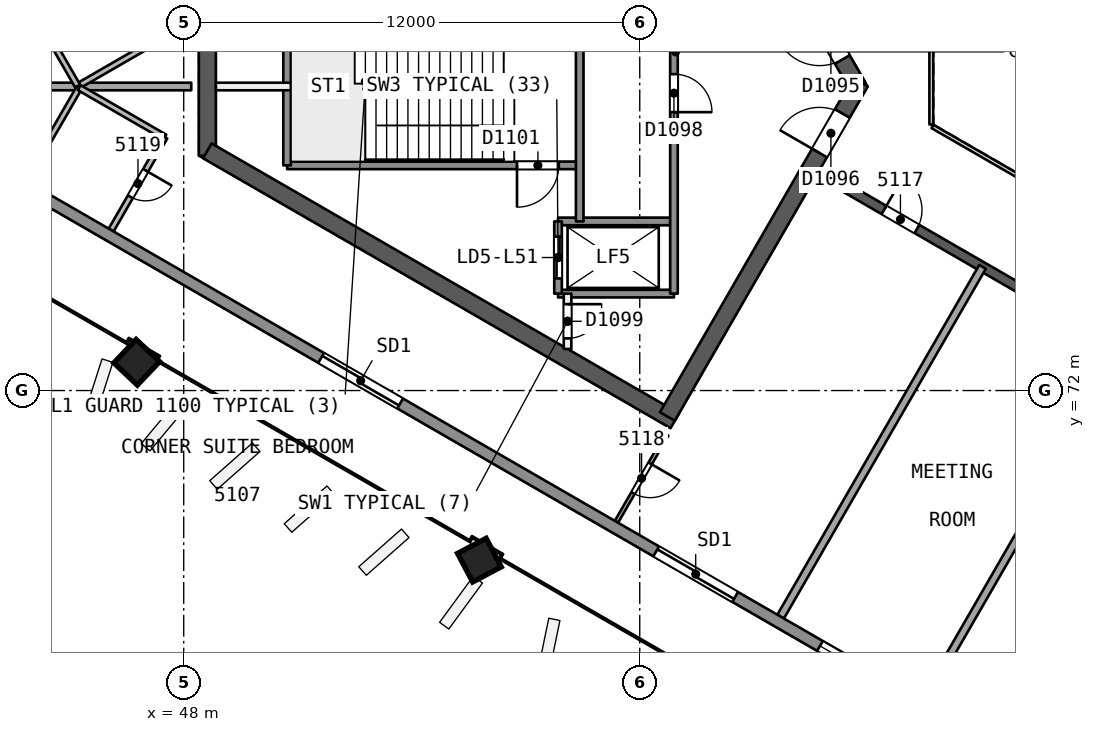
"""IFC4 building model, lengths in metres.
Left out: names, types, materials, properties, quantities, classifications, styles, units other than length and angle.
Written with IfcOpenShell. Run it as: python <this file> out.ifc"""

import sys

from ifc_helpers import new_model, si_unit, direction, frame, frame_2d, origin, origin_2d, place, context, subcontext, project, spatial, rectangle, extrude, element, fill, save


model = new_model("IFC4")
c1 = context("Model", 3, precision=1e-05, world=origin(), true_north=direction((0.0, 1.0)))
c2 = subcontext(c1, "Body", "Model", "MODEL_VIEW")
j1 = project(units=[si_unit("LENGTHUNIT", "METRE"), si_unit("PLANEANGLEUNIT", "RADIAN")], contexts=[c1])
p1 = place(None, origin())
s1 = spatial("IfcSite", under=j1, at=p1, CompositionType="ELEMENT")
p2 = place(p1, origin())
s2 = spatial("IfcBuilding", under=s1, at=p2, CompositionType="ELEMENT")
p3 = place(p2, frame((0.0, 0.0, 209.5)))
s3 = spatial("IfcBuildingStorey", under=s2, at=p3, CompositionType="ELEMENT", Elevation=209.5)
p4 = place(p3, frame((65.74, 80.0, 0.0), z_axis=(0.0, 0.0, 1.0), x_axis=(-0.499991857942, 0.866030104553, 0.0)))
e1 = element("IfcWall", 1, at=p4, inside=s3, PredefinedType="SHEAR", context=c2, shape_type="SweptSolid", body=[
    extrude(rectangle(XDim=10.25, YDim=0.45, at=frame_2d((5.125, 0.0))), origin(), (0.0, 0.0, 1.0), 3.7),
])
p5 = place(p4, frame((0.82, 0.0, 0.0)))
e2 = element("IfcOpeningElement", 2, at=p5, cuts=e1, PredefinedType="OPENING", context=c2, shape_type="SweptSolid", body=[
    extrude(rectangle(XDim=1.2, YDim=2.1, at=frame_2d((0.6, 1.05))), frame((0.0, 0.235, 0.0), z_axis=(0.0, -1.0, 0.0), x_axis=(1.0, 0.0, 0.0)), (0.0, 0.0, 1.0), 0.471),
])
p6 = place(p3, frame((48.622, 81.693, 0.0), z_axis=(0.0, 0.0, 1.0), x_axis=(0.0, -1.0, 0.0)))
e3 = element("IfcWall", 3, at=p6, inside=s3, PredefinedType="SHEAR", context=c2, shape_type="SweptSolid", body=[
    extrude(rectangle(XDim=3.515, YDim=0.45, at=frame_2d((1.758, 0.0))), origin(), (0.0, 0.0, 1.0), 3.7),
])
p7 = place(p3, frame((48.622, 78.307, 0.0), z_axis=(0.0, 0.0, 1.0), x_axis=(0.86602701116, -0.499997215934, 0.0)))
e4 = element("IfcWall", 4, at=p7, inside=s3, PredefinedType="SHEAR", context=c2, shape_type="SweptSolid", body=[
    extrude(rectangle(XDim=14.204, YDim=0.45, at=frame_2d((7.102, 0.0))), origin(), (0.0, 0.0, 1.0), 3.7),
])
p8 = place(p3, frame((60.728, 71.318, 0.0), z_axis=(0.0, 0.0, 1.0), x_axis=(0.500012416173, 0.866018235185, 0.0)))
e5 = element("IfcWall", 5, at=p8, inside=s3, PredefinedType="SHEAR", context=c2, shape_type="SweptSolid", body=[
    extrude(rectangle(XDim=10.155, YDim=0.45, at=frame_2d((5.078, 0.0))), origin(), (0.0, 0.0, 1.0), 3.7),
])
p9 = place(p8, frame((8.005, 0.0, 0.0)))
e6 = element("IfcOpeningElement", 6, at=p9, cuts=e5, PredefinedType="OPENING", context=c2, shape_type="SweptSolid", body=[
    extrude(rectangle(XDim=1.2, YDim=2.1, at=frame_2d((0.6, 1.05))), frame((0.0, 0.235, 0.0), z_axis=(0.0, -1.0, 0.0), x_axis=(1.0, 0.0, 0.0)), (0.0, 0.0, 1.0), 0.471),
])
p10 = place(p3, frame((64.7, 77.748, 0.0), z_axis=(0.0, 0.0, 1.0), x_axis=(0.866026492143, -0.499998114903, 0.0)))
e7 = element("IfcWall", 7, at=p10, inside=s3, PredefinedType="SHEAR", context=c2, shape_type="SweptSolid", body=[
    extrude(rectangle(XDim=15.588, YDim=0.25, at=frame_2d((7.794, 0.0))), origin(), (0.0, 0.0, 1.0), 3.3),
])
p11 = place(p10, frame((1.994, 0.0, 0.0)))
e8 = element("IfcOpeningElement", 8, at=p11, cuts=e7, PredefinedType="OPENING", context=c2, shape_type="SweptSolid", body=[
    extrude(rectangle(XDim=1.0, YDim=2.1, at=frame_2d((0.5, 1.05))), frame((0.0, 0.135, 0.0), z_axis=(0.0, -1.0, 0.0), x_axis=(1.0, 0.0, 0.0)), (0.0, 0.0, 1.0), 0.271),
])
p12 = place(p10, frame((6.571, 0.0, 0.0)))
e9 = element("IfcOpeningElement", 9, at=p12, cuts=e7, PredefinedType="OPENING", context=c2, shape_type="SweptSolid", body=[
    extrude(rectangle(XDim=1.2, YDim=2.4, at=frame_2d((0.6, 1.2))), frame((0.0, 0.135, 0.0), z_axis=(0.0, -1.0, 0.0), x_axis=(1.0, 0.0, 0.0)), (0.0, 0.0, 1.0), 0.271),
])
p13 = place(p10, frame((11.971, 0.0, 0.0)))
e10 = element("IfcOpeningElement", 10, at=p13, cuts=e7, PredefinedType="OPENING", context=c2, shape_type="SweptSolid", body=[
    extrude(rectangle(XDim=1.0, YDim=2.1, at=frame_2d((0.5, 1.05))), frame((0.0, 0.135, 0.0), z_axis=(0.0, -1.0, 0.0), x_axis=(1.0, 0.0, 0.0)), (0.0, 0.0, 1.0), 0.271),
])
p14 = place(p3, frame((46.729, 72.736, 0.0), z_axis=(0.02855911485, 0.006793507689, 0.999569019734), x_axis=(-0.865324312193, 0.500758709147, 0.021320176848)))
e11 = element("IfcColumn", 11, at=p14, inside=s3, PredefinedType="COLUMN", context=c2, shape_type="SweptSolid", body=[
    extrude(rectangle(XDim=0.85, YDim=0.85, at=origin_2d()), origin(), (0.0, 0.0, 1.0), 3.702),
])
p15 = place(p3, frame((55.758, 67.523, 0.0), z_axis=(0.019328516974, 0.012138044789, 0.999739504221), x_axis=(-0.865685889808, 0.500474070789, 0.010660424724)))
e12 = element("IfcColumn", 12, at=p15, inside=s3, PredefinedType="COLUMN", context=c2, shape_type="SweptSolid", body=[
    extrude(rectangle(XDim=0.85, YDim=0.85, at=origin_2d()), origin(), (0.0, 0.0, 1.0), 3.701),
])
p16 = place(p3, frame((47.462, 81.308, 0.0), z_axis=(0.0, 0.0, 1.0), x_axis=(-0.866021400173, -0.500006934395, 0.0)))
e13 = element("IfcWall", 13, at=p16, inside=s3, PredefinedType="PARTITIONING", context=c2, shape_type="SweptSolid", body=[
    extrude(rectangle(XDim=2.6, YDim=0.15, at=frame_2d((1.3, 0.0))), origin(), (0.0, 0.0, 1.0), 3.3),
])
p17 = place(p3, frame((45.211, 80.008, 0.0), z_axis=(0.0, 0.0, 1.0), x_axis=(-0.499954589381, 0.86605162003, 0.0)))
e14 = element("IfcWall", 14, at=p17, inside=s3, PredefinedType="PARTITIONING", context=c2, shape_type="SweptSolid", body=[
    extrude(rectangle(XDim=2.519, YDim=0.15, at=frame_2d((1.259, 0.0))), origin(), (0.0, 0.0, 1.0), 3.3),
])
p18 = place(p3, frame((43.951, 80.0, 0.0), z_axis=(0.0, 0.0, 1.0), x_axis=(1.0, 0.0, 0.0)))
e15 = element("IfcWall", 15, at=p18, inside=s3, PredefinedType="PARTITIONING", context=c2, shape_type="SweptSolid", body=[
    extrude(rectangle(XDim=4.247, YDim=0.2, at=frame_2d((2.123, 0.0))), origin(), (0.0, 0.0, 1.0), 3.3),
])
p19 = place(p3, frame((60.71, 70.838, 0.0), z_axis=(0.0, 0.0, 1.0), x_axis=(-0.49995654735, -0.86605048973, 0.0)))
e16 = element("IfcWall", 16, at=p19, inside=s3, PredefinedType="PARTITIONING", context=c2, shape_type="SweptSolid", body=[
    extrude(rectangle(XDim=2.648, YDim=0.1, at=frame_2d((1.324, 0.0))), origin(), (0.0, 0.0, 1.0), 3.3),
])
p20 = place(p19, frame((0.874, 0.0, 0.0)))
e17 = element("IfcOpeningElement", 17, at=p20, cuts=e16, PredefinedType="OPENING", context=c2, shape_type="SweptSolid", body=[
    extrude(rectangle(XDim=0.9, YDim=2.1, at=frame_2d((0.45, 1.05))), frame((0.0, 0.061, 0.0), z_axis=(0.0, -1.0, 0.0), x_axis=(1.0, 0.0, 0.0)), (0.0, 0.0, 1.0), 0.121),
])
p21 = place(p3, frame((63.707, 66.051, 0.0), z_axis=(0.0, 0.0, 1.0), x_axis=(0.499993571489, 0.866029115255, 0.0)))
e18 = element("IfcWall", 18, at=p21, inside=s3, PredefinedType="PARTITIONING", context=c2, shape_type="SweptSolid", body=[
    extrude(rectangle(XDim=10.627, YDim=0.2, at=frame_2d((5.313, 0.0))), origin(), (0.0, 0.0, 1.0), 3.3),
])
p22 = place(p3, frame((43.951, 77.718, 0.0), z_axis=(0.0, 0.0, 1.0), x_axis=(0.499988060406, 0.866032297002, 0.0)))
e19 = element("IfcWall", 19, at=p22, inside=s3, PredefinedType="PARTITIONING", context=c2, shape_type="SweptSolid", body=[
    extrude(rectangle(XDim=2.599, YDim=0.15, at=frame_2d((1.3, 0.0))), origin(), (0.0, 0.0, 1.0), 3.3),
])
p23 = place(p3, frame((45.251, 79.969, 0.0), z_axis=(0.0, 0.0, 1.0), x_axis=(0.866062058628, -0.499936506574, 0.0)))
e20 = element("IfcWall", 20, at=p23, inside=s3, PredefinedType="PARTITIONING", context=c2, shape_type="SweptSolid", body=[
    extrude(rectangle(XDim=2.6, YDim=0.15, at=frame_2d((1.3, 0.0))), origin(), (0.0, 0.0, 1.0), 3.3),
])
p24 = place(p3, frame((47.503, 78.669, 0.0), z_axis=(0.0, 0.0, 1.0), x_axis=(-0.500014143148, -0.86601723808, 0.0)))
e21 = element("IfcWall", 21, at=p24, inside=s3, PredefinedType="PARTITIONING", context=c2, shape_type="SweptSolid", body=[
    extrude(rectangle(XDim=2.826, YDim=0.15, at=frame_2d((1.413, 0.0))), origin(), (0.0, 0.0, 1.0), 3.3),
])
p25 = place(p24, frame((1.013, 0.0, 0.0)))
e22 = element("IfcOpeningElement", 22, at=p25, cuts=e21, PredefinedType="OPENING", context=c2, shape_type="SweptSolid", body=[
    extrude(rectangle(XDim=0.8, YDim=2.1, at=frame_2d((0.4, 1.05))), frame((0.0, 0.085, 0.0), z_axis=(0.0, -1.0, 0.0), x_axis=(1.0, 0.0, 0.0)), (0.0, 0.0, 1.0), 0.171),
])
p26 = place(p3, frame((67.487, 63.868, 0.0), z_axis=(0.0, 0.0, 1.0), x_axis=(0.499993571489, 0.866029115255, 0.0)))
e23 = element("IfcWall", 23, at=p26, inside=s3, PredefinedType="PARTITIONING", context=c2, shape_type="SweptSolid", body=[
    extrude(rectangle(XDim=10.627, YDim=0.2, at=frame_2d((5.313, 0.0))), origin(), (0.0, 0.0, 1.0), 3.3),
])
p27 = place(p3, frame((88.322, 51.667, 0.0), z_axis=(0.0, 0.0, 1.0), x_axis=(-0.866026224187, 0.499998579018, 0.0)))
e24 = element("IfcWall", 24, at=p27, inside=s3, PredefinedType="SOLIDWALL", context=c2, shape_type="SweptSolid", body=[
    extrude(rectangle(XDim=51.406, YDim=0.3, at=frame_2d((25.703, 0.0))), origin(), (0.0, 0.0, 1.0), 3.3),
])
p28 = place(p27, frame((29.803, 0.0, 0.0)))
e25 = element("IfcOpeningElement", 25, at=p28, cuts=e24, PredefinedType="OPENING", context=c2, shape_type="SweptSolid", body=[
    extrude(rectangle(XDim=2.4, YDim=2.4, at=frame_2d((1.2, 1.2))), frame((0.0, 0.161, 0.0), z_axis=(0.0, -1.0, 0.0), x_axis=(1.0, 0.0, 0.0)), (0.0, 0.0, 1.0), 0.321),
])
p29 = place(p27, frame((39.983, 0.0, 0.0)))
e26 = element("IfcOpeningElement", 26, at=p29, cuts=e24, PredefinedType="OPENING", context=c2, shape_type="SweptSolid", body=[
    extrude(rectangle(XDim=2.4, YDim=2.4, at=frame_2d((1.2, 1.2))), frame((0.0, 0.161, 0.0), z_axis=(0.0, -1.0, 0.0), x_axis=(1.0, 0.0, 0.0)), (0.0, 0.0, 1.0), 0.321),
])
p30 = place(p27, frame((19.827, 0.0, 0.0)))
e27 = element("IfcOpeningElement", 27, at=p30, cuts=e24, PredefinedType="OPENING", context=c2, shape_type="SweptSolid", body=[
    extrude(rectangle(XDim=2.4, YDim=2.4, at=frame_2d((1.2, 1.2))), frame((0.0, 0.161, 0.0), z_axis=(0.0, -1.0, 0.0), x_axis=(1.0, 0.0, 0.0)), (0.0, 0.0, 1.0), 0.321),
])
p31 = place(p27, frame((9.0, 0.0, 0.0)))
e28 = element("IfcOpeningElement", 28, at=p31, cuts=e24, PredefinedType="OPENING", context=c2, shape_type="SweptSolid", body=[
    extrude(rectangle(XDim=2.4, YDim=2.4, at=frame_2d((1.2, 1.2))), frame((0.0, 0.161, 0.0), z_axis=(0.0, -1.0, 0.0), x_axis=(1.0, 0.0, 0.0)), (0.0, 0.0, 1.0), 0.321),
])
p32 = place(p27, frame((25.427, 0.0, 0.9)))
e29 = element("IfcOpeningElement", 29, at=p32, cuts=e24, PredefinedType="OPENING", context=c2, shape_type="SweptSolid", body=[
    extrude(rectangle(XDim=1.8, YDim=1.5, at=frame_2d((0.9, 0.75))), frame((0.0, 0.161, 0.0), z_axis=(0.0, -1.0, 0.0), x_axis=(1.0, 0.0, 0.0)), (0.0, 0.0, 1.0), 0.321),
])
p33 = place(p3, frame((50.82, 80.0, 0.0), z_axis=(0.0, 0.0, 1.0), x_axis=(-1.0, 0.0, 0.0)))
e30 = element("IfcWall", 30, at=p33, inside=s3, PredefinedType="PARTITIONING", context=c2, shape_type="SweptSolid", body=[
    extrude(rectangle(XDim=1.973, YDim=0.2, at=frame_2d((0.987, 0.0))), origin(), (0.0, 0.0, 1.0), 3.3),
])
p34 = place(p3, frame((58.42, 77.925, 0.0), z_axis=(0.0, 0.0, 1.0), x_axis=(-1.0, 0.0, 0.0)))
e31 = element("IfcWall", 31, at=p34, inside=s3, PredefinedType="SOLIDWALL", context=c2, shape_type="SweptSolid", body=[
    extrude(rectangle(XDim=7.7, YDim=0.2, at=frame_2d((3.85, 0.0))), origin(), (0.0, 0.0, 1.0), 3.3),
])
p35 = place(p34, frame((0.55, 0.0, 0.0)))
e32 = element("IfcOpeningElement", 32, at=p35, cuts=e31, PredefinedType="OPENING", context=c2, shape_type="SweptSolid", body=[
    extrude(rectangle(XDim=1.1, YDim=2.1, at=frame_2d((0.55, 1.05))), frame((0.0, 0.11, 0.0), z_axis=(0.0, -1.0, 0.0), x_axis=(1.0, 0.0, 0.0)), (0.0, 0.0, 1.0), 0.221),
])
for number, where, z_axis, x_axis in (
    (33, (60.9, 76.45, 0.0), (0.0, 0.0, 1.0), (-1.0, 0.0, 0.0)),
    (34, (60.9, 74.55, 0.0), (0.0, 0.0, 1.0), (-1.0, 0.0, 0.0)),
):
    element("IfcWall", number, at=place(p3, frame(where, z_axis=z_axis, x_axis=x_axis)), inside=s3, PredefinedType="SOLIDWALL", context=c2, shape_type="SweptSolid", body=[
        extrude(rectangle(XDim=3.05, YDim=0.2, at=frame_2d((1.525, 0.0))), origin(), (0.0, 0.0, 1.0), 3.3),
    ])
p36 = place(p3, frame((60.9, 85.45, 0.0), z_axis=(0.0, 0.0, 1.0), x_axis=(0.0, -1.0, 0.0)))
e35 = element("IfcWall", 35, at=p36, inside=s3, PredefinedType="SOLIDWALL", context=c2, shape_type="SweptSolid", body=[
    extrude(rectangle(XDim=10.9, YDim=0.2, at=frame_2d((5.45, 0.0))), origin(), (0.0, 0.0, 1.0), 3.3),
])
p37 = place(p36, frame((0.625, 0.0, 0.0)))
e36 = element("IfcOpeningElement", 36, at=p37, cuts=e35, PredefinedType="OPENING", context=c2, shape_type="SweptSolid", body=[
    extrude(rectangle(XDim=1.0, YDim=2.1, at=frame_2d((0.5, 1.05))), frame((0.0, 0.11, 0.0), z_axis=(0.0, -1.0, 0.0), x_axis=(1.0, 0.0, 0.0)), (0.0, 0.0, 1.0), 0.221),
])
p38 = place(p36, frame((5.125, 0.0, 0.0)))
e37 = element("IfcOpeningElement", 37, at=p38, cuts=e35, PredefinedType="OPENING", context=c2, shape_type="SweptSolid", body=[
    extrude(rectangle(XDim=1.0, YDim=2.1, at=frame_2d((0.5, 1.05))), frame((0.0, 0.11, 0.0), z_axis=(0.0, -1.0, 0.0), x_axis=(1.0, 0.0, 0.0)), (0.0, 0.0, 1.0), 0.221),
])
p39 = place(p3, frame((58.42, 87.09, 0.0), z_axis=(0.0, 0.0, 1.0), x_axis=(0.0, -1.0, 0.0)))
e38 = element("IfcWall", 38, at=p39, inside=s3, PredefinedType="SOLIDWALL", context=c2, shape_type="SweptSolid", body=[
    extrude(rectangle(XDim=10.64, YDim=0.2, at=frame_2d((5.32, 0.0))), origin(), (0.0, 0.0, 1.0), 3.3),
])
p40 = place(p39, frame((0.37, 0.0, 0.0)))
e39 = element("IfcOpeningElement", 39, at=p40, cuts=e38, PredefinedType="OPENING", context=c2, shape_type="SweptSolid", body=[
    extrude(rectangle(XDim=0.9, YDim=2.1, at=frame_2d((0.45, 1.05))), frame((0.0, 0.11, 0.0), z_axis=(0.0, -1.0, 0.0), x_axis=(1.0, 0.0, 0.0)), (0.0, 0.0, 1.0), 0.221),
])
p41 = place(p3, frame((58.1, 74.55, 0.0), z_axis=(0.0, 0.0, 1.0), x_axis=(0.0, -1.0, 0.0)))
e40 = element("IfcWall", 40, at=p41, inside=s3, PredefinedType="PARTITIONING", context=c2, shape_type="SweptSolid", body=[
    extrude(rectangle(XDim=1.455, YDim=0.2, at=frame_2d((0.728, 0.0))), origin(), (0.0, 0.0, 1.0), 3.3),
])
p42 = place(p41, frame((0.278, 0.0, 0.0)))
e41 = element("IfcOpeningElement", 41, at=p42, cuts=e40, PredefinedType="OPENING", context=c2, shape_type="SweptSolid", body=[
    extrude(rectangle(XDim=0.9, YDim=2.1, at=frame_2d((0.45, 1.05))), frame((0.0, 0.11, 0.0), z_axis=(0.0, -1.0, 0.0), x_axis=(1.0, 0.0, 0.0)), (0.0, 0.0, 1.0), 0.221),
])
p43 = place(p3, frame((57.85, 76.45, 0.0), z_axis=(0.0, 0.0, 1.0), x_axis=(0.0, -1.0, 0.0)))
e42 = element("IfcWall", 42, at=p43, inside=s3, PredefinedType="SOLIDWALL", context=c2, shape_type="SweptSolid", body=[
    extrude(rectangle(XDim=1.9, YDim=0.2, at=frame_2d((0.95, 0.0))), origin(), (0.0, 0.0, 1.0), 3.3),
])
p44 = place(p43, frame((0.4, 0.0, 0.0)))
e43 = element("IfcOpeningElement", 43, at=p44, cuts=e42, PredefinedType="OPENING", context=c2, shape_type="SweptSolid", body=[
    extrude(rectangle(XDim=1.1, YDim=2.1, at=frame_2d((0.55, 1.05))), frame((0.0, 0.11, 0.0), z_axis=(0.0, -1.0, 0.0), x_axis=(1.0, 0.0, 0.0)), (0.0, 0.0, 1.0), 0.221),
])
p45 = place(p3, frame((50.72, 82.075, 0.0), z_axis=(0.0, 0.0, 1.0), x_axis=(0.0, -1.0, 0.0)))
e44 = element("IfcWall", 44, at=p45, inside=s3, PredefinedType="SOLIDWALL", context=c2, shape_type="SweptSolid", body=[
    extrude(rectangle(XDim=4.15, YDim=0.2, at=frame_2d((2.075, 0.0))), origin(), (0.0, 0.0, 1.0), 3.3),
])
p46 = place(p3, frame((67.672, 81.0, 0.0), z_axis=(0.0, 0.0, 1.0), x_axis=(0.0, -1.0, 0.0)))
e45 = element("IfcWall", 45, at=p46, inside=s3, PredefinedType="PARTITIONING", context=c2, shape_type="SweptSolid", body=[
    extrude(rectangle(XDim=2.0, YDim=0.1, at=frame_2d((1.0, 0.0))), origin(), (0.0, 0.0, 1.0), 3.3),
])
p47 = place(p3, frame((67.702, 78.948, 0.0), z_axis=(0.0, 0.0, 1.0), x_axis=(0.866026658274, -0.499997827154, 0.0)))
e46 = element("IfcWall", 46, at=p47, inside=s3, PredefinedType="PARTITIONING", context=c2, shape_type="SweptSolid", body=[
    extrude(rectangle(XDim=11.588, YDim=0.1, at=frame_2d((5.794, 0.0))), origin(), (0.0, 0.0, 1.0), 3.3),
])
p48 = place(p11, origin())
e47 = element("IfcDoor", 47, at=p48, inside=s3, OperationType="SINGLE_SWING_LEFT", PredefinedType="NOTDEFINED", context=c2, shape_type="SweptSolid", body=[
    extrude(rectangle(XDim=1.0, YDim=2.1, at=frame_2d((0.5, 1.05))), frame((0.0, 0.025, 0.0), z_axis=(0.0, -1.0, 0.0), x_axis=(1.0, 0.0, 0.0)), (0.0, 0.0, 1.0), 0.05),
])
fill(e8, e47)
p49 = place(p20, origin())
e48 = element("IfcDoor", 48, at=p49, inside=s3, OperationType="SINGLE_SWING_LEFT", PredefinedType="NOTDEFINED", context=c2, shape_type="SweptSolid", body=[
    extrude(rectangle(XDim=0.9, YDim=2.1, at=frame_2d((0.45, 1.05))), frame((0.0, 0.025, 0.0), z_axis=(0.0, -1.0, 0.0), x_axis=(1.0, 0.0, 0.0)), (0.0, 0.0, 1.0), 0.05),
])
fill(e17, e48)
p50 = place(p25, origin())
e49 = element("IfcDoor", 49, at=p50, inside=s3, OperationType="SINGLE_SWING_LEFT", PredefinedType="NOTDEFINED", context=c2, shape_type="SweptSolid", body=[
    extrude(rectangle(XDim=0.8, YDim=2.1, at=frame_2d((0.4, 1.05))), frame((0.0, 0.025, 0.0), z_axis=(0.0, -1.0, 0.0), x_axis=(1.0, 0.0, 0.0)), (0.0, 0.0, 1.0), 0.05),
])
fill(e22, e49)
p51 = place(p28, origin())
e50 = element("IfcDoor", 50, at=p51, inside=s3, OperationType="SLIDING_TO_LEFT", PredefinedType="NOTDEFINED", context=c2, shape_type="SweptSolid", body=[
    extrude(rectangle(XDim=2.4, YDim=2.4, at=frame_2d((1.2, 1.2))), frame((0.0, 0.025, 0.0), z_axis=(0.0, -1.0, 0.0), x_axis=(1.0, 0.0, 0.0)), (0.0, 0.0, 1.0), 0.05),
])
fill(e25, e50)
p52 = place(p29, origin())
e51 = element("IfcDoor", 51, at=p52, inside=s3, OperationType="SLIDING_TO_RIGHT", PredefinedType="NOTDEFINED", context=c2, shape_type="SweptSolid", body=[
    extrude(rectangle(XDim=2.4, YDim=2.4, at=frame_2d((1.2, 1.2))), frame((0.0, 0.025, 0.0), z_axis=(0.0, -1.0, 0.0), x_axis=(1.0, 0.0, 0.0)), (0.0, 0.0, 1.0), 0.05),
])
fill(e26, e51)
p53 = place(p32, origin())
e52 = element("IfcWindow", 52, at=p53, inside=s3, PartitioningType="SINGLE_PANEL", PredefinedType="WINDOW", context=c2, shape_type="SweptSolid", body=[
    extrude(rectangle(XDim=1.8, YDim=1.5, at=frame_2d((0.9, 0.75))), frame((0.0, 0.03, 0.0), z_axis=(0.0, -1.0, 0.0), x_axis=(1.0, 0.0, 0.0)), (0.0, 0.0, 1.0), 0.06),
])
fill(e29, e52)
p54 = place(p5, origin())
e53 = element("IfcDoor", 53, at=p54, inside=s3, OperationType="SINGLE_SWING_RIGHT", PredefinedType="NOTDEFINED", context=c2, shape_type="SweptSolid", body=[
    extrude(rectangle(XDim=1.2, YDim=2.1, at=frame_2d((0.6, 1.05))), frame((0.0, 0.025, 0.0), z_axis=(0.0, -1.0, 0.0), x_axis=(1.0, 0.0, 0.0)), (0.0, 0.0, 1.0), 0.05),
])
fill(e2, e53)
p55 = place(p9, origin())
e54 = element("IfcDoor", 54, at=p55, inside=s3, OperationType="SINGLE_SWING_LEFT", PredefinedType="NOTDEFINED", context=c2, shape_type="SweptSolid", body=[
    extrude(rectangle(XDim=1.2, YDim=2.1, at=frame_2d((0.6, 1.05))), frame((0.0, 0.025, 0.0), z_axis=(0.0, -1.0, 0.0), x_axis=(1.0, 0.0, 0.0)), (0.0, 0.0, 1.0), 0.05),
])
fill(e6, e54)
p56 = place(p44, origin())
e55 = element("IfcDoor", 55, at=p56, inside=s3, OperationType="SLIDING_TO_RIGHT", PredefinedType="NOTDEFINED", context=c2, shape_type="SweptSolid", body=[
    extrude(rectangle(XDim=1.1, YDim=2.1, at=frame_2d((0.55, 1.05))), frame((0.0, 0.025, 0.0), z_axis=(0.0, -1.0, 0.0), x_axis=(1.0, 0.0, 0.0)), (0.0, 0.0, 1.0), 0.05),
])
fill(e43, e55)
p57 = place(p38, origin())
e56 = element("IfcDoor", 56, at=p57, inside=s3, OperationType="SINGLE_SWING_RIGHT", PredefinedType="NOTDEFINED", context=c2, shape_type="SweptSolid", body=[
    extrude(rectangle(XDim=1.0, YDim=2.1, at=frame_2d((0.5, 1.05))), frame((0.0, 0.025, 0.0), z_axis=(0.0, -1.0, 0.0), x_axis=(1.0, 0.0, 0.0)), (0.0, 0.0, 1.0), 0.05),
])
fill(e37, e56)
p58 = place(p42, origin())
e57 = element("IfcDoor", 57, at=p58, inside=s3, OperationType="SINGLE_SWING_LEFT", PredefinedType="NOTDEFINED", context=c2, shape_type="SweptSolid", body=[
    extrude(rectangle(XDim=0.9, YDim=2.1, at=frame_2d((0.45, 1.05))), frame((0.0, 0.025, 0.0), z_axis=(0.0, -1.0, 0.0), x_axis=(1.0, 0.0, 0.0)), (0.0, 0.0, 1.0), 0.05),
])
fill(e41, e57)
p59 = place(p35, origin())
e58 = element("IfcDoor", 58, at=p59, inside=s3, OperationType="SINGLE_SWING_RIGHT", PredefinedType="NOTDEFINED", context=c2, shape_type="SweptSolid", body=[
    extrude(rectangle(XDim=1.1, YDim=2.1, at=frame_2d((0.55, 1.05))), frame((0.0, 0.025, 0.0), z_axis=(0.0, -1.0, 0.0), x_axis=(1.0, 0.0, 0.0)), (0.0, 0.0, 1.0), 0.05),
])
fill(e32, e58)
save(model, sys.argv[1])
